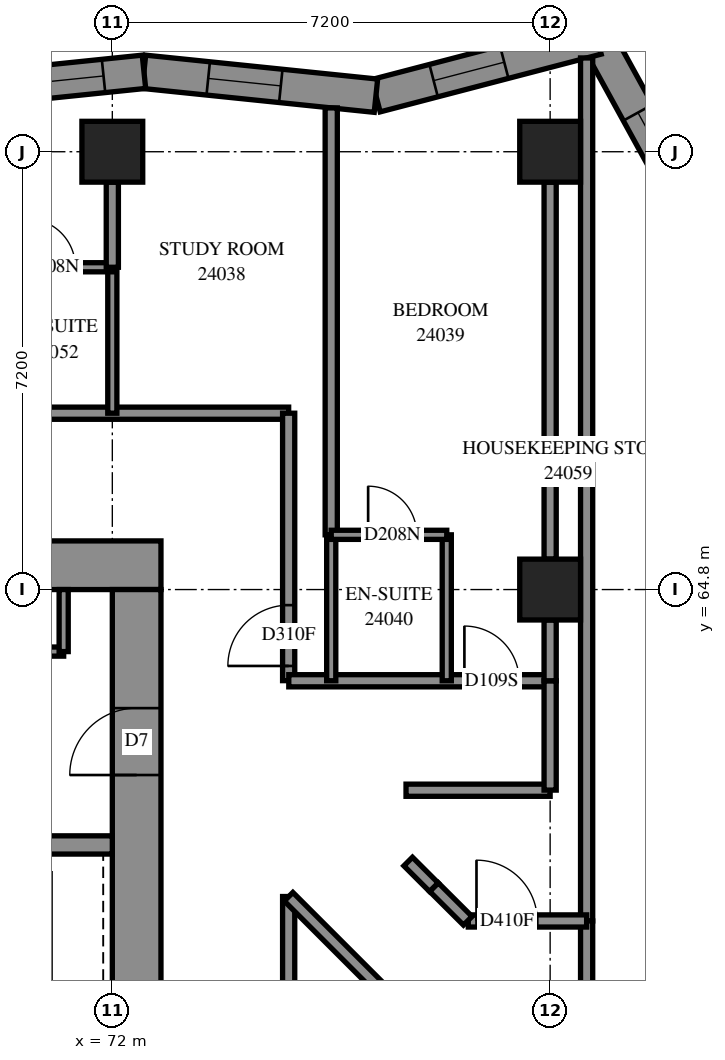
"""IFC4 building model, lengths in metres.
Left out: names, types, materials, properties, quantities, classifications, styles, units other than length and angle.
Written with IfcOpenShell. Run it as: python <this file> out.ifc"""

import sys

from ifc_helpers import new_model, si_unit, direction, frame, frame_2d, origin, origin_2d, place, context, subcontext, project, spatial, polyline, rectangle, outline, extrude, element, fill, save


model = new_model("IFC4")
c1 = context("Model", 3, precision=1e-05, world=origin(), true_north=direction((0.0, 1.0)))
c2 = subcontext(c1, "Body", "Model", "MODEL_VIEW")
j1 = project(units=[si_unit("LENGTHUNIT", "METRE"), si_unit("PLANEANGLEUNIT", "RADIAN")], contexts=[c1])
p1 = place(None, origin())
s1 = spatial("IfcSite", under=j1, at=p1, CompositionType="ELEMENT")
p2 = place(p1, origin())
s2 = spatial("IfcBuilding", under=s1, at=p2, CompositionType="ELEMENT")
p3 = place(p2, frame((0.0, 0.0, 91.4)))
s3 = spatial("IfcBuildingStorey", under=s2, at=p3, CompositionType="ELEMENT", Elevation=91.4)
for number, where, z_axis, x_axis in (
    (1, (72.0, 72.0, 0.0), (0.0, 0.0, 1.0), (1.0, 0.0, 0.0)),
    (2, (79.2, 64.8, 0.0), (0.0, 0.0, 1.0), (1.0, 0.0, 0.0)),
    (3, (79.2, 72.0, 0.0), (0.0, 0.0, 1.0), (1.0, 0.0, 0.0)),
):
    element("IfcColumn", number, at=place(p3, frame(where, z_axis=z_axis, x_axis=x_axis)), inside=s3, PredefinedType="COLUMN", context=c2, shape_type="SweptSolid", body=[
        extrude(rectangle(XDim=1.0, YDim=1.0, at=origin_2d()), origin(), (0.0, 0.0, 1.0), 3.1),
    ])
p4 = place(p3, frame((56.8, 65.2, -0.3), z_axis=(0.0, 0.0, 1.0), x_axis=(1.0, 0.0, 0.0)))
e4 = element("IfcWall", 4, at=p4, inside=s3, PredefinedType="SHEAR", context=c2, shape_type="SweptSolid", body=[
    extrude(rectangle(XDim=16.0, YDim=0.8, at=frame_2d((8.0, 0.0))), origin(), (0.0, 0.0, 1.0), 2.7),
])
p5 = place(p4, frame((10.8, 0.0, 0.3)))
e5 = element("IfcOpeningElement", 5, at=p5, cuts=e4, PredefinedType="OPENING", context=c2, shape_type="SweptSolid", body=[
    extrude(rectangle(XDim=0.8, YDim=2.1, at=frame_2d((0.4, 1.05))), frame((0.0, 0.41, 0.0), z_axis=(0.0, -1.0, 0.0), x_axis=(1.0, 0.0, 0.0)), (0.0, 0.0, 1.0), 0.82),
])
p6 = place(p3, frame((72.4, 50.4, -0.3), z_axis=(0.0, 0.0, 1.0), x_axis=(0.0, 1.0, 0.0)))
e6 = element("IfcWall", 6, at=p6, inside=s3, PredefinedType="SHEAR", context=c2, shape_type="SweptSolid", body=[
    extrude(rectangle(XDim=14.4, YDim=0.8, at=frame_2d((7.2, 0.0))), origin(), (0.0, 0.0, 1.0), 2.7),
])
p7 = place(p6, frame((4.55, 0.0, 0.3)))
e7 = element("IfcOpeningElement", 7, at=p7, cuts=e6, PredefinedType="OPENING", context=c2, shape_type="SweptSolid", body=[
    extrude(rectangle(XDim=1.1, YDim=2.1, at=frame_2d((0.55, 1.05))), frame((0.0, 0.41, 0.0), z_axis=(0.0, -1.0, 0.0), x_axis=(1.0, 0.0, 0.0)), (0.0, 0.0, 1.0), 0.82),
])
p8 = place(p6, frame((11.35, 0.0, 0.3)))
e8 = element("IfcOpeningElement", 8, at=p8, cuts=e6, PredefinedType="OPENING", context=c2, shape_type="SweptSolid", body=[
    extrude(rectangle(XDim=1.1, YDim=2.1, at=frame_2d((0.55, 1.05))), frame((0.0, 0.41, 0.0), z_axis=(0.0, -1.0, 0.0), x_axis=(1.0, 0.0, 0.0)), (0.0, 0.0, 1.0), 0.82),
])
p9 = place(p3, frame((64.8, 60.6, 0.0), z_axis=(0.0, 0.0, 1.0), x_axis=(1.0, 0.0, 0.0)))
e9 = element("IfcWall", 9, at=p9, inside=s3, PredefinedType="SOLIDWALL", context=c2, shape_type="SweptSolid", body=[
    extrude(rectangle(XDim=7.2, YDim=0.3, at=frame_2d((3.6, 0.0))), origin(), (0.0, 0.0, 1.0), 3.1),
])
p10 = place(p3, frame((76.372, 49.373, -0.3), z_axis=(0.0, 0.0, 1.0), x_axis=(0.7071067812, 0.7071067812, 0.0)))
e10 = element("IfcWall", 10, at=p10, inside=s3, PredefinedType="SHEAR", context=c2, shape_type="SweptSolid", body=[
    extrude(rectangle(XDim=14.4, YDim=0.8, at=frame_2d((7.2, 0.0))), origin(), (0.0, 0.0, 1.0), 2.7),
])
p11 = place(p10, frame((4.55, 0.0, 0.3)))
e11 = element("IfcOpeningElement", 11, at=p11, cuts=e10, PredefinedType="OPENING", context=c2, shape_type="SweptSolid", body=[
    extrude(rectangle(XDim=1.1, YDim=2.1, at=frame_2d((0.55, 1.05))), frame((0.0, 0.41, 0.0), z_axis=(0.0, -1.0, 0.0), x_axis=(1.0, 0.0, 0.0)), (0.0, 0.0, 1.0), 0.82),
])
p12 = place(p10, frame((11.35, 0.0, 0.3)))
e12 = element("IfcOpeningElement", 12, at=p12, cuts=e10, PredefinedType="OPENING", context=c2, shape_type="SweptSolid", body=[
    extrude(rectangle(XDim=1.1, YDim=2.1, at=frame_2d((0.55, 1.05))), frame((0.0, 0.41, 0.0), z_axis=(0.0, -1.0, 0.0), x_axis=(1.0, 0.0, 0.0)), (0.0, 0.0, 1.0), 0.82),
])
p13 = place(p3, frame((81.602, 70.9, 0.0), z_axis=(0.0, 0.0, 1.0), x_axis=(-0.4815099031, 0.8764406501, 0.0)))
e13 = element("IfcWall", 13, at=p13, inside=s3, PredefinedType="SOLIDWALL", context=c2, shape_type="SweptSolid", body=[
    extrude(outline(polyline([(0.055, -0.275), (3.604, -0.275), (3.176, 0.275), (-0.055, 0.275), (0.055, -0.275)])), origin(), (0.0, 0.0, 1.0), 3.1),
])
p14 = place(p13, frame((0.79, 0.0, 0.5)))
e14 = element("IfcOpeningElement", 14, at=p14, cuts=e13, PredefinedType="OPENING", context=c2, shape_type="SweptSolid", body=[
    extrude(rectangle(XDim=1.2, YDim=2.45, at=frame_2d((0.6, 1.225))), frame((0.0, 0.285, 0.0), z_axis=(0.0, -1.0, 0.0), x_axis=(1.0, 0.0, 0.0)), (0.0, 0.0, 1.0), 0.57),
])
p15 = place(p3, frame((79.97, 73.871, 0.0), z_axis=(0.0, 0.0, 1.0), x_axis=(-0.9675281625, -0.2527632385, 0.0)))
e15 = element("IfcWall", 15, at=p15, inside=s3, PredefinedType="SOLIDWALL", context=c2, shape_type="SweptSolid", body=[
    extrude(outline(polyline([(-0.214, -0.275), (3.707, -0.275), (3.806, 0.275), (0.214, 0.275), (-0.214, -0.275)])), origin(), (0.0, 0.0, 1.0), 3.1),
])
p16 = place(p15, frame((1.576, 0.0, 0.5)))
e16 = element("IfcOpeningElement", 16, at=p16, cuts=e15, PredefinedType="OPENING", context=c2, shape_type="SweptSolid", body=[
    extrude(rectangle(XDim=1.2, YDim=2.45, at=frame_2d((0.6, 1.225))), frame((0.0, 0.285, 0.0), z_axis=(0.0, -1.0, 0.0), x_axis=(1.0, 0.0, 0.0)), (0.0, 0.0, 1.0), 0.57),
])
p17 = place(p3, frame((76.335, 72.921, 0.0), z_axis=(0.0, 0.0, 1.0), x_axis=(-0.9947305582, 0.1025237367, 0.0)))
e17 = element("IfcWall", 17, at=p17, inside=s3, PredefinedType="SOLIDWALL", context=c2, shape_type="SweptSolid", body=[
    extrude(outline(polyline([(0.05, -0.275), (3.864, -0.275), (3.807, 0.275), (-0.05, 0.275), (0.05, -0.275)])), origin(), (0.0, 0.0, 1.0), 3.1),
])
p18 = place(p17, frame((1.573, 0.0, 0.5)))
e18 = element("IfcOpeningElement", 18, at=p18, cuts=e17, PredefinedType="OPENING", context=c2, shape_type="SweptSolid", body=[
    extrude(rectangle(XDim=1.2, YDim=2.45, at=frame_2d((0.6, 1.225))), frame((0.0, 0.285, 0.0), z_axis=(0.0, -1.0, 0.0), x_axis=(1.0, 0.0, 0.0)), (0.0, 0.0, 1.0), 0.57),
])
p19 = place(p3, frame((72.52, 73.314, 0.0), z_axis=(0.0, 0.0, 1.0), x_axis=(-0.9947306832, -0.1025225234, 0.0)))
e19 = element("IfcWall", 19, at=p19, inside=s3, PredefinedType="SOLIDWALL", context=c2, shape_type="SweptSolid", body=[
    extrude(outline(polyline([(-0.028, -0.275), (3.785, -0.275), (3.842, 0.275), (0.028, 0.275), (-0.028, -0.275)])), origin(), (0.0, 0.0, 1.0), 3.1),
])
p20 = place(p19, frame((0.668, 0.0, 0.5)))
e20 = element("IfcOpeningElement", 20, at=p20, cuts=e19, PredefinedType="OPENING", context=c2, shape_type="SweptSolid", body=[
    extrude(rectangle(XDim=1.3, YDim=2.45, at=frame_2d((0.65, 1.225))), frame((0.0, 0.285, 0.0), z_axis=(0.0, -1.0, 0.0), x_axis=(1.0, 0.0, 0.0)), (0.0, 0.0, 1.0), 0.57),
])
p21 = place(p19, frame((2.168, 0.0, 0.5)))
e21 = element("IfcOpeningElement", 21, at=p21, cuts=e19, PredefinedType="OPENING", context=c2, shape_type="SweptSolid", body=[
    extrude(rectangle(XDim=1.3, YDim=2.45, at=frame_2d((0.65, 1.225))), frame((0.0, 0.285, 0.0), z_axis=(0.0, -1.0, 0.0), x_axis=(1.0, 0.0, 0.0)), (0.0, 0.0, 1.0), 0.57),
])
p22 = place(p3, frame((64.95, 63.78, 0.0), z_axis=(0.0, 0.0, 1.0), x_axis=(1.0, 0.0, 0.0)))
e22 = element("IfcWall", 22, at=p22, inside=s3, PredefinedType="PARTITIONING", context=c2, shape_type="SweptSolid", body=[
    extrude(rectangle(XDim=6.25, YDim=0.15, at=frame_2d((3.125, 0.0))), origin(), (0.0, 0.0, 1.0), 3.1),
])
p23 = place(p3, frame((71.2, 63.78, 0.0), z_axis=(0.0, 0.0, 1.0), x_axis=(0.0, 1.0, 0.0)))
e23 = element("IfcWall", 23, at=p23, inside=s3, PredefinedType="PARTITIONING", context=c2, shape_type="SweptSolid", body=[
    extrude(rectangle(XDim=1.02, YDim=0.15, at=frame_2d((0.51, 0.0))), origin(), (0.0, 0.0, 1.0), 3.1),
])
p24 = place(p3, frame((54.7, 67.7, 0.0), z_axis=(0.0, 0.0, 1.0), x_axis=(1.0, 0.0, 0.0)))
e24 = element("IfcWall", 24, at=p24, inside=s3, PredefinedType="PARTITIONING", context=c2, shape_type="SweptSolid", body=[
    extrude(rectangle(XDim=20.2, YDim=0.2, at=frame_2d((10.1, 0.0))), origin(), (0.0, 0.0, 1.0), 3.1),
])
p25 = place(p24, frame((5.25, 0.0, 0.0)))
e25 = element("IfcOpeningElement", 25, at=p25, cuts=e24, PredefinedType="OPENING", context=c2, shape_type="SweptSolid", body=[
    extrude(rectangle(XDim=0.9, YDim=2.1, at=frame_2d((0.45, 1.05))), frame((0.0, 0.11, 0.0), z_axis=(0.0, -1.0, 0.0), x_axis=(1.0, 0.0, 0.0)), (0.0, 0.0, 1.0), 0.22),
])
p26 = place(p24, frame((6.9, 0.0, 0.0)))
e26 = element("IfcOpeningElement", 26, at=p26, cuts=e24, PredefinedType="OPENING", context=c2, shape_type="SweptSolid", body=[
    extrude(rectangle(XDim=0.9, YDim=2.1, at=frame_2d((0.45, 1.05))), frame((0.0, 0.11, 0.0), z_axis=(0.0, -1.0, 0.0), x_axis=(1.0, 0.0, 0.0)), (0.0, 0.0, 1.0), 0.22),
])
p27 = place(p24, frame((12.45, 0.0, 0.0)))
e27 = element("IfcOpeningElement", 27, at=p27, cuts=e24, PredefinedType="OPENING", context=c2, shape_type="SweptSolid", body=[
    extrude(rectangle(XDim=0.9, YDim=2.1, at=frame_2d((0.45, 1.05))), frame((0.0, 0.11, 0.0), z_axis=(0.0, -1.0, 0.0), x_axis=(1.0, 0.0, 0.0)), (0.0, 0.0, 1.0), 0.22),
])
p28 = place(p24, frame((14.1, 0.0, 0.0)))
e28 = element("IfcOpeningElement", 28, at=p28, cuts=e24, PredefinedType="OPENING", context=c2, shape_type="SweptSolid", body=[
    extrude(rectangle(XDim=0.9, YDim=2.1, at=frame_2d((0.45, 1.05))), frame((0.0, 0.11, 0.0), z_axis=(0.0, -1.0, 0.0), x_axis=(1.0, 0.0, 0.0)), (0.0, 0.0, 1.0), 0.22),
])
p29 = place(p3, frame((79.8, 59.35, 0.0), z_axis=(0.0, 0.0, 1.0), x_axis=(0.0, 1.0, 0.0)))
e29 = element("IfcWall", 29, at=p29, inside=s3, PredefinedType="PARTITIONING", context=c2, shape_type="SweptSolid", body=[
    extrude(rectangle(XDim=14.192, YDim=0.2, at=frame_2d((7.096, 0.0))), origin(), (0.0, 0.0, 1.0), 3.1),
])
p30 = place(p3, frame((75.6, 65.7, 0.0), z_axis=(0.0, 0.0, 1.0), x_axis=(0.0, 1.0, 0.0)))
e30 = element("IfcWall", 30, at=p30, inside=s3, PredefinedType="PARTITIONING", context=c2, shape_type="SweptSolid", body=[
    extrude(rectangle(XDim=7.021, YDim=0.2, at=frame_2d((3.51, 0.0))), origin(), (0.0, 0.0, 1.0), 3.1),
])
p31 = place(p3, frame((79.2, 65.3, 0.0), z_axis=(0.0, 0.0, 1.0), x_axis=(0.0, 1.0, 0.0)))
e31 = element("IfcWall", 31, at=p31, inside=s3, PredefinedType="PARTITIONING", context=c2, shape_type="SweptSolid", body=[
    extrude(rectangle(XDim=6.2, YDim=0.2, at=frame_2d((3.1, 0.0))), origin(), (0.0, 0.0, 1.0), 3.1),
])
p32 = place(p3, frame((74.9, 53.7, 0.0), z_axis=(0.0, 0.0, 1.0), x_axis=(0.0, 1.0, 0.0)))
e32 = element("IfcWall", 32, at=p32, inside=s3, PredefinedType="PARTITIONING", context=c2, shape_type="SweptSolid", body=[
    extrude(rectangle(XDim=6.052, YDim=0.2, at=frame_2d((3.026, 0.0))), origin(), (0.0, 0.0, 1.0), 3.1),
])
p33 = place(p32, frame((0.142, 0.0, 0.0)))
e33 = element("IfcOpeningElement", 33, at=p33, cuts=e32, PredefinedType="OPENING", context=c2, shape_type="SweptSolid", body=[
    extrude(rectangle(XDim=1.0, YDim=2.1, at=frame_2d((0.5, 1.05))), frame((0.0, 0.11, 0.0), z_axis=(0.0, -1.0, 0.0), x_axis=(1.0, 0.0, 0.0)), (0.0, 0.0, 1.0), 0.22),
])
p34 = place(p3, frame((74.9, 63.302, 0.0), z_axis=(0.0, 0.0, 1.0), x_axis=(0.0, 1.0, 0.0)))
e34 = element("IfcWall", 34, at=p34, inside=s3, PredefinedType="PARTITIONING", context=c2, shape_type="SweptSolid", body=[
    extrude(rectangle(XDim=4.398, YDim=0.2, at=frame_2d((2.199, 0.0))), origin(), (0.0, 0.0, 1.0), 3.1),
])
p35 = place(p34, frame((0.242, 0.0, 0.0)))
e35 = element("IfcOpeningElement", 35, at=p35, cuts=e34, PredefinedType="OPENING", context=c2, shape_type="SweptSolid", body=[
    extrude(rectangle(XDim=1.0, YDim=2.1, at=frame_2d((0.5, 1.05))), frame((0.0, 0.11, 0.0), z_axis=(0.0, -1.0, 0.0), x_axis=(1.0, 0.0, 0.0)), (0.0, 0.0, 1.0), 0.22),
])
p36 = place(p3, frame((74.902, 63.3, 0.0), z_axis=(0.0, 0.0, 1.0), x_axis=(1.0, 0.0, 0.0)))
e36 = element("IfcWall", 36, at=p36, inside=s3, PredefinedType="PARTITIONING", context=c2, shape_type="SweptSolid", body=[
    extrude(rectangle(XDim=4.298, YDim=0.2, at=frame_2d((2.149, 0.0))), origin(), (0.0, 0.0, 1.0), 3.1),
])
p37 = place(p36, frame((2.888, 0.0, 0.0)))
e37 = element("IfcOpeningElement", 37, at=p37, cuts=e36, PredefinedType="OPENING", context=c2, shape_type="SweptSolid", body=[
    extrude(rectangle(XDim=0.9, YDim=2.1, at=frame_2d((0.45, 1.05))), frame((0.0, 0.11, 0.0), z_axis=(0.0, -1.0, 0.0), x_axis=(1.0, 0.0, 0.0)), (0.0, 0.0, 1.0), 0.22),
])
p38 = place(p3, frame((74.899, 59.749, 0.0), z_axis=(0.0, 0.0, 1.0), x_axis=(0.7071067812, -0.7071067812, 0.0)))
e38 = element("IfcWall", 38, at=p38, inside=s3, PredefinedType="PARTITIONING", context=c2, shape_type="SweptSolid", body=[
    extrude(rectangle(XDim=3.601, YDim=0.2, at=frame_2d((1.8, 0.0))), origin(), (0.0, 0.0, 1.0), 3.1),
])
p39 = place(p3, frame((79.8, 56.622, 0.0), z_axis=(0.0, 0.0, 1.0), x_axis=(0.0, 1.0, 0.0)))
e39 = element("IfcWall", 39, at=p39, inside=s3, PredefinedType="PARTITIONING", context=c2, shape_type="SweptSolid", body=[
    extrude(rectangle(XDim=2.728, YDim=0.2, at=frame_2d((1.364, 0.0))), origin(), (0.0, 0.0, 1.0), 3.1),
])
for number, where, z_axis, x_axis in (
    (40, (75.6, 63.3, 0.0), (0.0, 0.0, 1.0), (0.0, 1.0, 0.0)),
    (41, (77.5, 63.3, 0.0), (0.0, 0.0, 1.0), (0.0, 1.0, 0.0)),
    (42, (72.0, 67.7, 0.0), (0.0, 0.0, 1.0), (0.0, 1.0, 0.0)),
):
    element("IfcWall", number, at=place(p3, frame(where, z_axis=z_axis, x_axis=x_axis)), inside=s3, PredefinedType="PARTITIONING", context=c2, shape_type="SweptSolid", body=[
        extrude(rectangle(XDim=2.4, YDim=0.15, at=frame_2d((1.2, 0.0))), origin(), (0.0, 0.0, 1.0), 3.1),
    ])
p40 = place(p3, frame((76.83, 61.5, 0.0), z_axis=(0.0, 0.0, 1.0), x_axis=(1.0, 0.0, 0.0)))
e43 = element("IfcWall", 43, at=p40, inside=s3, PredefinedType="PARTITIONING", context=c2, shape_type="SweptSolid", body=[
    extrude(rectangle(XDim=2.37, YDim=0.2, at=frame_2d((1.185, 0.0))), origin(), (0.0, 0.0, 1.0), 3.1),
])
p41 = place(p3, frame((77.854, 59.35, 0.0), z_axis=(0.0, 0.0, 1.0), x_axis=(1.0, 0.0, 0.0)))
e44 = element("IfcWall", 44, at=p41, inside=s3, PredefinedType="PARTITIONING", context=c2, shape_type="SweptSolid", body=[
    extrude(rectangle(XDim=1.946, YDim=0.2, at=frame_2d((0.973, 0.0))), origin(), (0.0, 0.0, 1.0), 3.1),
])
p42 = place(p41, frame((0.135, 0.0, 0.0)))
e45 = element("IfcOpeningElement", 45, at=p42, cuts=e44, PredefinedType="OPENING", context=c2, shape_type="SweptSolid", body=[
    extrude(rectangle(XDim=1.0, YDim=2.1, at=frame_2d((0.5, 1.05))), frame((0.0, 0.11, 0.0), z_axis=(0.0, -1.0, 0.0), x_axis=(1.0, 0.0, 0.0)), (0.0, 0.0, 1.0), 0.22),
])
p43 = place(p3, frame((75.6, 65.7, 0.0), z_axis=(0.0, 0.0, 1.0), x_axis=(1.0, 0.0, 0.0)))
e46 = element("IfcWall", 46, at=p43, inside=s3, PredefinedType="PARTITIONING", context=c2, shape_type="SweptSolid", body=[
    extrude(rectangle(XDim=1.9, YDim=0.15, at=frame_2d((0.95, 0.0))), origin(), (0.0, 0.0, 1.0), 3.1),
])
p44 = place(p43, frame((0.607, 0.0, 0.0)))
e47 = element("IfcOpeningElement", 47, at=p44, cuts=e46, PredefinedType="OPENING", context=c2, shape_type="SweptSolid", body=[
    extrude(rectangle(XDim=0.8, YDim=2.1, at=frame_2d((0.4, 1.05))), frame((0.0, 0.085, 0.0), z_axis=(0.0, -1.0, 0.0), x_axis=(1.0, 0.0, 0.0)), (0.0, 0.0, 1.0), 0.17),
])
p45 = place(p3, frame((70.1, 70.1, 0.0), z_axis=(0.0, 0.0, 1.0), x_axis=(1.0, 0.0, 0.0)))
e48 = element("IfcWall", 48, at=p45, inside=s3, PredefinedType="PARTITIONING", context=c2, shape_type="SweptSolid", body=[
    extrude(rectangle(XDim=1.9, YDim=0.15, at=frame_2d((0.95, 0.0))), origin(), (0.0, 0.0, 1.0), 3.1),
])
p46 = place(p45, frame((0.493, 0.0, 0.0)))
e49 = element("IfcOpeningElement", 49, at=p46, cuts=e48, PredefinedType="OPENING", context=c2, shape_type="SweptSolid", body=[
    extrude(rectangle(XDim=0.8, YDim=2.1, at=frame_2d((0.4, 1.05))), frame((0.0, 0.085, 0.0), z_axis=(0.0, -1.0, 0.0), x_axis=(1.0, 0.0, 0.0)), (0.0, 0.0, 1.0), 0.17),
])
p47 = place(p3, frame((79.2, 61.502, 0.0), z_axis=(0.0, 0.0, 1.0), x_axis=(0.0, 1.0, 0.0)))
e50 = element("IfcWall", 50, at=p47, inside=s3, PredefinedType="PARTITIONING", context=c2, shape_type="SweptSolid", body=[
    extrude(rectangle(XDim=1.798, YDim=0.2, at=frame_2d((0.899, 0.0))), origin(), (0.0, 0.0, 1.0), 3.1),
])
p48 = place(p3, frame((72.0, 70.1, 0.0), z_axis=(0.0, 0.0, 1.0), x_axis=(0.0, 1.0, 0.0)))
e51 = element("IfcWall", 51, at=p48, inside=s3, PredefinedType="PARTITIONING", context=c2, shape_type="SweptSolid", body=[
    extrude(rectangle(XDim=1.4, YDim=0.2, at=frame_2d((0.7, 0.0))), origin(), (0.0, 0.0, 1.0), 3.1),
])
p49 = place(p3, frame((79.2, 63.3, 0.0), z_axis=(0.0, 0.0, 1.0), x_axis=(0.0, 1.0, 0.0)))
e52 = element("IfcWall", 52, at=p49, inside=s3, PredefinedType="PARTITIONING", context=c2, shape_type="SweptSolid", body=[
    extrude(rectangle(XDim=1.0, YDim=0.2, at=frame_2d((0.5, 0.0))), origin(), (0.0, 0.0, 1.0), 3.1),
])
p50 = place(p3, frame((77.289, 59.907, 0.0), z_axis=(0.0, 0.0, 1.0), x_axis=(0.7083796976, -0.7058315692, 0.0)))
e53 = element("IfcWall", 53, at=p50, inside=s3, PredefinedType="PARTITIONING", context=c2, shape_type="SweptSolid", body=[
    extrude(rectangle(XDim=0.785, YDim=0.2, at=frame_2d((0.393, 0.0))), origin(), (0.0, 0.0, 1.0), 3.1),
])
p51 = place(p3, frame((76.865, 60.327, 0.0), z_axis=(0.0, 0.0, 1.0), x_axis=(0.7071067812, -0.7071067812, 0.0)))
e54 = element("IfcWall", 54, at=p51, inside=s3, PredefinedType="PARTITIONING", context=c2, shape_type="SweptSolid", body=[
    extrude(rectangle(XDim=0.597, YDim=0.2, at=frame_2d((0.298, 0.0))), origin(), (0.0, 0.0, 1.0), 3.1),
])
p52 = place(p14, origin())
e55 = element("IfcWindow", 55, at=p52, inside=s3, PartitioningType="SINGLE_PANEL", PredefinedType="WINDOW", context=c2, shape_type="SweptSolid", body=[
    extrude(rectangle(XDim=1.2, YDim=2.45, at=frame_2d((0.6, 1.225))), frame((0.0, 0.155, 0.0), z_axis=(0.0, -1.0, 0.0), x_axis=(1.0, 0.0, 0.0)), (0.0, 0.0, 1.0), 0.06),
])
fill(e14, e55)
p53 = place(p16, origin())
e56 = element("IfcWindow", 56, at=p53, inside=s3, PartitioningType="SINGLE_PANEL", PredefinedType="WINDOW", context=c2, shape_type="SweptSolid", body=[
    extrude(rectangle(XDim=1.2, YDim=2.45, at=frame_2d((0.6, 1.225))), frame((0.0, 0.155, 0.0), z_axis=(0.0, -1.0, 0.0), x_axis=(1.0, 0.0, 0.0)), (0.0, 0.0, 1.0), 0.06),
])
fill(e16, e56)
p54 = place(p18, origin())
e57 = element("IfcWindow", 57, at=p54, inside=s3, PartitioningType="SINGLE_PANEL", PredefinedType="WINDOW", context=c2, shape_type="SweptSolid", body=[
    extrude(rectangle(XDim=1.2, YDim=2.45, at=frame_2d((0.6, 1.225))), frame((0.0, 0.155, 0.0), z_axis=(0.0, -1.0, 0.0), x_axis=(1.0, 0.0, 0.0)), (0.0, 0.0, 1.0), 0.06),
])
fill(e18, e57)
p55 = place(p20, origin())
e58 = element("IfcWindow", 58, at=p55, inside=s3, PartitioningType="SINGLE_PANEL", PredefinedType="WINDOW", context=c2, shape_type="SweptSolid", body=[
    extrude(rectangle(XDim=1.3, YDim=2.45, at=frame_2d((0.65, 1.225))), frame((0.0, 0.155, 0.0), z_axis=(0.0, -1.0, 0.0), x_axis=(1.0, 0.0, 0.0)), (0.0, 0.0, 1.0), 0.06),
])
fill(e20, e58)
p56 = place(p8, origin())
e59 = element("IfcDoor", 59, at=p56, inside=s3, OperationType="SINGLE_SWING_RIGHT", PredefinedType="DOOR", context=c2, shape_type="SweptSolid", body=[
    extrude(rectangle(XDim=1.1, YDim=2.1, at=frame_2d((0.55, 1.05))), frame((0.0, 0.025, 0.0), z_axis=(0.0, -1.0, 0.0), x_axis=(1.0, 0.0, 0.0)), (0.0, 0.0, 1.0), 0.05),
])
fill(e8, e59)
p57 = place(p35, origin())
e60 = element("IfcDoor", 60, at=p57, inside=s3, OperationType="SINGLE_SWING_RIGHT", PredefinedType="DOOR", context=c2, shape_type="SweptSolid", body=[
    extrude(rectangle(XDim=1.0, YDim=2.1, at=frame_2d((0.5, 1.05))), frame((0.0, 0.025, 0.0), z_axis=(0.0, -1.0, 0.0), x_axis=(1.0, 0.0, 0.0)), (0.0, 0.0, 1.0), 0.05),
])
fill(e35, e60)
p58 = place(p37, origin())
e61 = element("IfcDoor", 61, at=p58, inside=s3, OperationType="SINGLE_SWING_LEFT", PredefinedType="DOOR", context=c2, shape_type="SweptSolid", body=[
    extrude(rectangle(XDim=0.9, YDim=2.1, at=frame_2d((0.45, 1.05))), frame((0.0, 0.025, 0.0), z_axis=(0.0, -1.0, 0.0), x_axis=(1.0, 0.0, 0.0)), (0.0, 0.0, 1.0), 0.05),
])
fill(e37, e61)
p59 = place(p44, origin())
e62 = element("IfcDoor", 62, at=p59, inside=s3, OperationType="SINGLE_SWING_RIGHT", PredefinedType="DOOR", context=c2, shape_type="SweptSolid", body=[
    extrude(rectangle(XDim=0.8, YDim=2.1, at=frame_2d((0.4, 1.05))), frame((0.0, 0.025, 0.0), z_axis=(0.0, -1.0, 0.0), x_axis=(1.0, 0.0, 0.0)), (0.0, 0.0, 1.0), 0.05),
])
fill(e47, e62)
p60 = place(p46, origin())
e63 = element("IfcDoor", 63, at=p60, inside=s3, OperationType="SINGLE_SWING_RIGHT", PredefinedType="DOOR", context=c2, shape_type="SweptSolid", body=[
    extrude(rectangle(XDim=0.8, YDim=2.1, at=frame_2d((0.4, 1.05))), frame((0.0, 0.025, 0.0), z_axis=(0.0, -1.0, 0.0), x_axis=(1.0, 0.0, 0.0)), (0.0, 0.0, 1.0), 0.05),
])
fill(e49, e63)
p61 = place(p42, origin())
e64 = element("IfcDoor", 64, at=p61, inside=s3, OperationType="SINGLE_SWING_LEFT", PredefinedType="DOOR", context=c2, shape_type="SweptSolid", body=[
    extrude(rectangle(XDim=1.0, YDim=2.1, at=frame_2d((0.5, 1.05))), frame((0.0, 0.025, 0.0), z_axis=(0.0, -1.0, 0.0), x_axis=(1.0, 0.0, 0.0)), (0.0, 0.0, 1.0), 0.05),
])
fill(e45, e64)
save(model, sys.argv[1])
